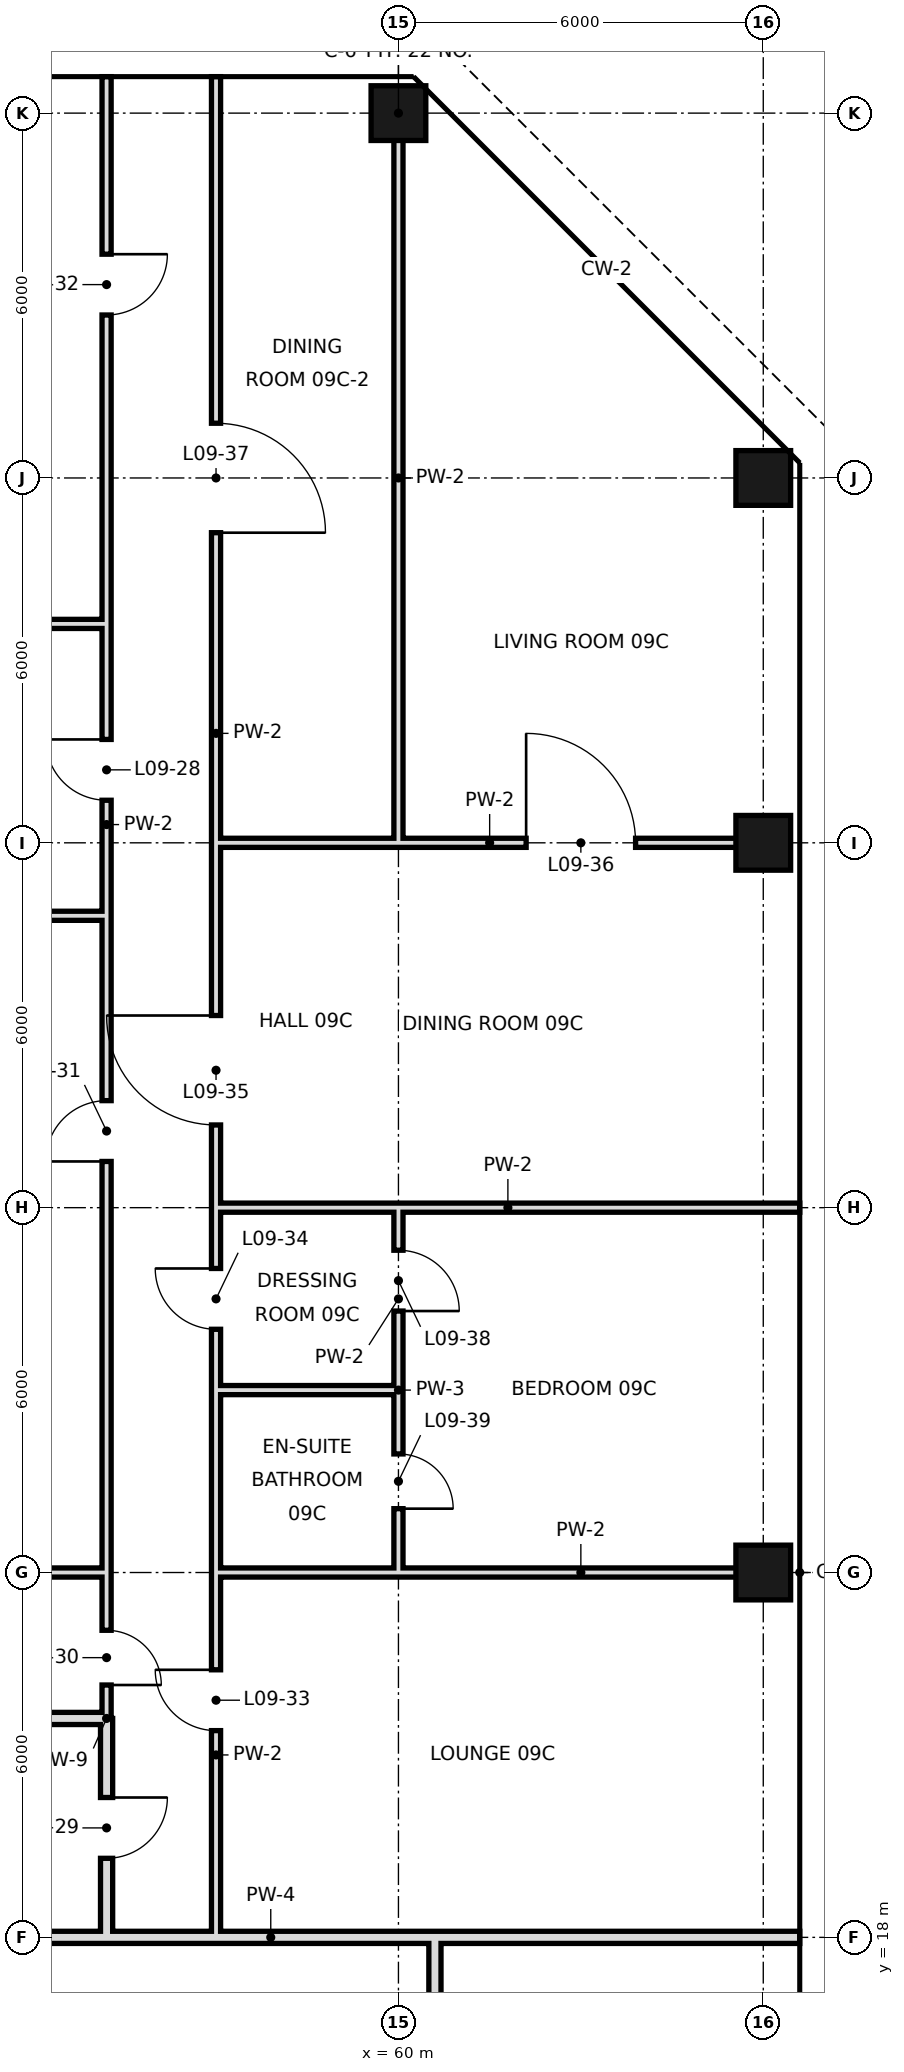
"""IFC4 building model, lengths in metres.
Left out: names, types, materials, properties, quantities, classifications, styles, units other than length and angle.
Written with IfcOpenShell. Run it as: python <this file> out.ifc"""

import sys

from ifc_helpers import new_model, si_unit, direction, frame, frame_2d, origin, origin_2d, place, context, subcontext, project, spatial, rectangle, hollow_rectangle, extrude, element, fill, save


model = new_model("IFC4")
c1 = context("Model", 3, precision=1e-05, world=origin(), true_north=direction((0.0, 1.0)))
c2 = subcontext(c1, "Body", "Model", "MODEL_VIEW")
j1 = project(units=[si_unit("LENGTHUNIT", "METRE"), si_unit("PLANEANGLEUNIT", "RADIAN")], contexts=[c1])
p1 = place(None, origin())
s1 = spatial("IfcSite", under=j1, at=p1, CompositionType="ELEMENT")
p2 = place(p1, origin())
s2 = spatial("IfcBuilding", under=s1, at=p2, CompositionType="ELEMENT")
p3 = place(p2, frame((0.0, 0.0, 53.4)))
s3 = spatial("IfcBuildingStorey", under=s2, at=p3, CompositionType="ELEMENT", Elevation=53.4)
for number, where, z_axis, x_axis in (
    (1, (60.0, 48.0, 0.0), (0.0, 0.0, 1.0), (1.0, 0.0, 0.0)),
    (2, (66.0, 24.0, 0.0), (0.0, 0.0, 1.0), (1.0, 0.0, 0.0)),
    (3, (66.0, 36.0, 0.0), (0.0, 0.0, 1.0), (1.0, 0.0, 0.0)),
    (4, (66.0, 42.0, 0.0), (0.0, 0.0, 1.0), (1.0, 0.0, 0.0)),
):
    element("IfcColumn", number, at=place(p3, frame(where, z_axis=z_axis, x_axis=x_axis)), inside=s3, PredefinedType="COLUMN", context=c2, shape_type="SweptSolid", body=[
        extrude(hollow_rectangle(XDim=0.9, YDim=0.9, WallThickness=0.045, at=origin_2d()), origin(), (0.0, 0.0, 1.0), 3.6),
    ])
p4 = place(p3, frame((55.2, 18.0, 0.0), z_axis=(0.0, 0.0, 1.0), x_axis=(0.0, 1.0, 0.0)))
e5 = element("IfcWall", 5, at=p4, inside=s3, PredefinedType="SOLIDWALL", context=c2, shape_type="SweptSolid", body=[
    extrude(rectangle(XDim=3.6, YDim=0.2, at=frame_2d((1.8, 0.0))), origin(), (0.0, 0.0, 1.0), 2.52),
])
p5 = place(p4, frame((1.3, 0.0, 0.0)))
e6 = element("IfcOpeningElement", 6, at=p5, cuts=e5, PredefinedType="OPENING", context=c2, shape_type="SweptSolid", body=[
    extrude(rectangle(XDim=1.0, YDim=2.4, at=frame_2d((0.5, 1.2))), frame((0.0, 0.11, 0.0), z_axis=(0.0, -1.0, 0.0), x_axis=(1.0, 0.0, 0.0)), (0.0, 0.0, 1.0), 0.22),
])
p6 = place(p3, frame((55.2, 24.0, 0.0), z_axis=(0.0, 0.0, 1.0), x_axis=(0.0, 1.0, 0.0)))
e7 = element("IfcWall", 7, at=p6, inside=s3, PredefinedType="PARTITIONING", context=c2, shape_type="SweptSolid", body=[
    extrude(rectangle(XDim=24.6, YDim=0.15, at=frame_2d((12.3, 0.0))), origin(), (0.0, 0.0, 1.0), 3.42),
])
p7 = place(p6, frame((12.7, 0.0, 0.0)))
e8 = element("IfcOpeningElement", 8, at=p7, cuts=e7, PredefinedType="OPENING", context=c2, shape_type="SweptSolid", body=[
    extrude(rectangle(XDim=1.0, YDim=2.4, at=frame_2d((0.5, 1.2))), frame((0.0, 0.085, 0.0), z_axis=(0.0, -1.0, 0.0), x_axis=(1.0, 0.0, 0.0)), (0.0, 0.0, 1.0), 0.17),
])
p8 = place(p6, frame((6.76, 0.0, 0.0)))
e9 = element("IfcOpeningElement", 9, at=p8, cuts=e7, PredefinedType="OPENING", context=c2, shape_type="SweptSolid", body=[
    extrude(rectangle(XDim=1.0, YDim=2.4, at=frame_2d((0.5, 1.2))), frame((0.0, 0.085, 0.0), z_axis=(0.0, -1.0, 0.0), x_axis=(1.0, 0.0, 0.0)), (0.0, 0.0, 1.0), 0.17),
])
p9 = place(p6, frame((20.68, 0.0, 0.0)))
e10 = element("IfcOpeningElement", 10, at=p9, cuts=e7, PredefinedType="OPENING", context=c2, shape_type="SweptSolid", body=[
    extrude(rectangle(XDim=1.0, YDim=2.4, at=frame_2d((0.5, 1.2))), frame((0.0, 0.085, 0.0), z_axis=(0.0, -1.0, 0.0), x_axis=(1.0, 0.0, 0.0)), (0.0, 0.0, 1.0), 0.17),
])
p10 = place(p3, frame((55.2, 21.6, 0.0), z_axis=(0.0, 0.0, 1.0), x_axis=(0.0, 1.0, 0.0)))
e11 = element("IfcWall", 11, at=p10, inside=s3, PredefinedType="PARTITIONING", context=c2, shape_type="SweptSolid", body=[
    extrude(rectangle(XDim=2.4, YDim=0.15, at=frame_2d((1.2, 0.0))), origin(), (0.0, 0.0, 1.0), 3.42),
])
p11 = place(p10, frame((0.55, 0.0, 0.0)))
e12 = element("IfcOpeningElement", 12, at=p11, cuts=e11, PredefinedType="OPENING", context=c2, shape_type="SweptSolid", body=[
    extrude(rectangle(XDim=0.9, YDim=2.4, at=frame_2d((0.45, 1.2))), frame((0.0, 0.085, 0.0), z_axis=(0.0, -1.0, 0.0), x_axis=(1.0, 0.0, 0.0)), (0.0, 0.0, 1.0), 0.17),
])
p12 = place(p3, frame((57.0, 18.0, 0.0), z_axis=(0.0, 0.0, 1.0), x_axis=(0.0, 1.0, 0.0)))
e13 = element("IfcWall", 13, at=p12, inside=s3, PredefinedType="PARTITIONING", context=c2, shape_type="SweptSolid", body=[
    extrude(rectangle(XDim=6.0, YDim=0.15, at=frame_2d((3.0, 0.0))), origin(), (0.0, 0.0, 1.0), 3.42),
])
p13 = place(p12, frame((3.4, 0.0, 0.0)))
e14 = element("IfcOpeningElement", 14, at=p13, cuts=e13, PredefinedType="OPENING", context=c2, shape_type="SweptSolid", body=[
    extrude(rectangle(XDim=1.0, YDim=2.4, at=frame_2d((0.5, 1.2))), frame((0.0, 0.085, 0.0), z_axis=(0.0, -1.0, 0.0), x_axis=(1.0, 0.0, 0.0)), (0.0, 0.0, 1.0), 0.17),
])
p14 = place(p3, frame((57.0, 27.0, 0.0), z_axis=(0.0, 0.0, 1.0), x_axis=(0.0, 1.0, 0.0)))
e15 = element("IfcWall", 15, at=p14, inside=s3, PredefinedType="PARTITIONING", context=c2, shape_type="SweptSolid", body=[
    extrude(rectangle(XDim=21.6, YDim=0.15, at=frame_2d((10.8, 0.0))), origin(), (0.0, 0.0, 1.0), 3.42),
])
p15 = place(p14, frame((1.0, 0.0, 0.0)))
e16 = element("IfcOpeningElement", 16, at=p15, cuts=e15, PredefinedType="OPENING", context=c2, shape_type="SweptSolid", body=[
    extrude(rectangle(XDim=1.0, YDim=2.4, at=frame_2d((0.5, 1.2))), frame((0.0, 0.085, 0.0), z_axis=(0.0, -1.0, 0.0), x_axis=(1.0, 0.0, 0.0)), (0.0, 0.0, 1.0), 0.17),
])
p16 = place(p14, frame((4.36, 0.0, 0.0)))
e17 = element("IfcOpeningElement", 17, at=p16, cuts=e15, PredefinedType="OPENING", context=c2, shape_type="SweptSolid", body=[
    extrude(rectangle(XDim=1.8, YDim=2.4, at=frame_2d((0.9, 1.2))), frame((0.0, 0.085, 0.0), z_axis=(0.0, -1.0, 0.0), x_axis=(1.0, 0.0, 0.0)), (0.0, 0.0, 1.0), 0.17),
])
p17 = place(p14, frame((14.1, 0.0, 0.0)))
e18 = element("IfcOpeningElement", 18, at=p17, cuts=e15, PredefinedType="OPENING", context=c2, shape_type="SweptSolid", body=[
    extrude(rectangle(XDim=1.8, YDim=2.4, at=frame_2d((0.9, 1.2))), frame((0.0, 0.085, 0.0), z_axis=(0.0, -1.0, 0.0), x_axis=(1.0, 0.0, 0.0)), (0.0, 0.0, 1.0), 0.17),
])
p18 = place(p3, frame((57.0, 24.0, 0.0), z_axis=(0.0, 0.0, 1.0), x_axis=(0.0, 1.0, 0.0)))
e19 = element("IfcWall", 19, at=p18, inside=s3, PredefinedType="PARTITIONING", context=c2, shape_type="SweptSolid", body=[
    extrude(rectangle(XDim=3.0, YDim=0.15, at=frame_2d((1.5, 0.0))), origin(), (0.0, 0.0, 1.0), 3.42),
])
p19 = place(p3, frame((60.0, 27.0, 0.0), z_axis=(0.0, 0.0, 1.0), x_axis=(0.0, 1.0, 0.0)))
e20 = element("IfcWall", 20, at=p19, inside=s3, PredefinedType="PARTITIONING", context=c2, shape_type="SweptSolid", body=[
    extrude(rectangle(XDim=3.0, YDim=0.15, at=frame_2d((1.5, 0.0))), origin(), (0.0, 0.0, 1.0), 3.42),
])
p20 = place(p19, frame((1.3, 0.0, 0.0)))
e21 = element("IfcOpeningElement", 21, at=p20, cuts=e20, PredefinedType="OPENING", context=c2, shape_type="SweptSolid", body=[
    extrude(rectangle(XDim=1.0, YDim=2.4, at=frame_2d((0.5, 1.2))), frame((0.0, 0.085, 0.0), z_axis=(0.0, -1.0, 0.0), x_axis=(1.0, 0.0, 0.0)), (0.0, 0.0, 1.0), 0.17),
])
p21 = place(p3, frame((60.0, 36.0, 0.0), z_axis=(0.0, 0.0, 1.0), x_axis=(0.0, 1.0, 0.0)))
e22 = element("IfcWall", 22, at=p21, inside=s3, PredefinedType="PARTITIONING", context=c2, shape_type="SweptSolid", body=[
    extrude(rectangle(XDim=12.0, YDim=0.15, at=frame_2d((6.0, 0.0))), origin(), (0.0, 0.0, 1.0), 3.42),
])
p22 = place(p3, frame((60.0, 24.0, 0.0), z_axis=(0.0, 0.0, 1.0), x_axis=(0.0, 1.0, 0.0)))
e23 = element("IfcWall", 23, at=p22, inside=s3, PredefinedType="PARTITIONING", context=c2, shape_type="SweptSolid", body=[
    extrude(rectangle(XDim=3.0, YDim=0.15, at=frame_2d((1.5, 0.0))), origin(), (0.0, 0.0, 1.0), 3.42),
])
p23 = place(p22, frame((1.05, 0.0, 0.0)))
e24 = element("IfcOpeningElement", 24, at=p23, cuts=e23, PredefinedType="OPENING", context=c2, shape_type="SweptSolid", body=[
    extrude(rectangle(XDim=0.9, YDim=2.4, at=frame_2d((0.45, 1.2))), frame((0.0, 0.085, 0.0), z_axis=(0.0, -1.0, 0.0), x_axis=(1.0, 0.0, 0.0)), (0.0, 0.0, 1.0), 0.17),
])
p24 = place(p3, frame((60.6, 10.8, 0.0), z_axis=(0.0, 0.0, 1.0), x_axis=(0.0, 1.0, 0.0)))
e25 = element("IfcWall", 25, at=p24, inside=s3, PredefinedType="SOLIDWALL", context=c2, shape_type="SweptSolid", body=[
    extrude(rectangle(XDim=7.2, YDim=0.2, at=frame_2d((3.6, 0.0))), origin(), (0.0, 0.0, 1.0), 2.52),
])
p25 = place(p3, frame((44.9, 18.0, 0.0), z_axis=(0.0, 0.0, 1.0), x_axis=(1.0, 0.0, 0.0)))
e26 = element("IfcWall", 26, at=p25, inside=s3, PredefinedType="SOLIDWALL", context=c2, shape_type="SweptSolid", body=[
    extrude(rectangle(XDim=10.3, YDim=0.2, at=frame_2d((5.15, 0.0))), origin(), (0.0, 0.0, 1.0), 2.52),
])
p26 = place(p3, frame((60.6, 18.0, 0.0), z_axis=(0.0, 0.0, 1.0), x_axis=(1.0, 0.0, 0.0)))
e27 = element("IfcWall", 27, at=p26, inside=s3, PredefinedType="SOLIDWALL", context=c2, shape_type="SweptSolid", body=[
    extrude(rectangle(XDim=6.0, YDim=0.2, at=frame_2d((3.0, 0.0))), origin(), (0.0, 0.0, 1.0), 2.52),
])
p27 = place(p3, frame((55.2, 18.0, 0.0), z_axis=(0.0, 0.0, 1.0), x_axis=(1.0, 0.0, 0.0)))
e28 = element("IfcWall", 28, at=p27, inside=s3, PredefinedType="SOLIDWALL", context=c2, shape_type="SweptSolid", body=[
    extrude(rectangle(XDim=5.4, YDim=0.2, at=frame_2d((2.7, 0.0))), origin(), (0.0, 0.0, 1.0), 2.52),
])
p28 = place(p3, frame((44.9, 21.6, 0.0), z_axis=(0.0, 0.0, 1.0), x_axis=(1.0, 0.0, 0.0)))
e29 = element("IfcWall", 29, at=p28, inside=s3, PredefinedType="SOLIDWALL", context=c2, shape_type="SweptSolid", body=[
    extrude(rectangle(XDim=10.3, YDim=0.2, at=frame_2d((5.15, 0.0))), origin(), (0.0, 0.0, 1.0), 2.72),
])
p29 = place(p3, frame((60.0, 24.0, 0.0), z_axis=(0.0, 0.0, 1.0), x_axis=(1.0, 0.0, 0.0)))
e30 = element("IfcWall", 30, at=p29, inside=s3, PredefinedType="PARTITIONING", context=c2, shape_type="SweptSolid", body=[
    extrude(rectangle(XDim=6.0, YDim=0.15, at=frame_2d((3.0, 0.0))), origin(), (0.0, 0.0, 1.0), 2.52),
])
p30 = place(p3, frame((44.9, 24.0, 0.0), z_axis=(0.0, 0.0, 1.0), x_axis=(1.0, 0.0, 0.0)))
e31 = element("IfcWall", 31, at=p30, inside=s3, PredefinedType="PARTITIONING", context=c2, shape_type="SweptSolid", body=[
    extrude(rectangle(XDim=10.3, YDim=0.15, at=frame_2d((5.15, 0.0))), origin(), (0.0, 0.0, 1.0), 2.52),
])
p31 = place(p3, frame((57.0, 24.0, 0.0), z_axis=(0.0, 0.0, 1.0), x_axis=(1.0, 0.0, 0.0)))
e32 = element("IfcWall", 32, at=p31, inside=s3, PredefinedType="PARTITIONING", context=c2, shape_type="SweptSolid", body=[
    extrude(rectangle(XDim=3.0, YDim=0.15, at=frame_2d((1.5, 0.0))), origin(), (0.0, 0.0, 1.0), 2.52),
])
p32 = place(p3, frame((57.0, 27.0, 0.0), z_axis=(0.0, 0.0, 1.0), x_axis=(1.0, 0.0, 0.0)))
e33 = element("IfcWall", 33, at=p32, inside=s3, PredefinedType="PARTITIONING", context=c2, shape_type="SweptSolid", body=[
    extrude(rectangle(XDim=3.0, YDim=0.15, at=frame_2d((1.5, 0.0))), origin(), (0.0, 0.0, 1.0), 3.42),
])
p33 = place(p3, frame((57.0, 30.0, 0.0), z_axis=(0.0, 0.0, 1.0), x_axis=(1.0, 0.0, 0.0)))
e34 = element("IfcWall", 34, at=p33, inside=s3, PredefinedType="PARTITIONING", context=c2, shape_type="SweptSolid", body=[
    extrude(rectangle(XDim=9.6, YDim=0.15, at=frame_2d((4.8, 0.0))), origin(), (0.0, 0.0, 1.0), 2.52),
])
p34 = place(p3, frame((44.9, 34.8, 0.0), z_axis=(0.0, 0.0, 1.0), x_axis=(1.0, 0.0, 0.0)))
e35 = element("IfcWall", 35, at=p34, inside=s3, PredefinedType="PARTITIONING", context=c2, shape_type="SweptSolid", body=[
    extrude(rectangle(XDim=10.3, YDim=0.15, at=frame_2d((5.15, 0.0))), origin(), (0.0, 0.0, 1.0), 3.42),
])
p35 = place(p3, frame((57.0, 36.0, 0.0), z_axis=(0.0, 0.0, 1.0), x_axis=(1.0, 0.0, 0.0)))
e36 = element("IfcWall", 36, at=p35, inside=s3, PredefinedType="PARTITIONING", context=c2, shape_type="SweptSolid", body=[
    extrude(rectangle(XDim=9.0, YDim=0.15, at=frame_2d((4.5, 0.0))), origin(), (0.0, 0.0, 1.0), 2.52),
])
p36 = place(p35, frame((5.1, 0.0, 0.0)))
e37 = element("IfcOpeningElement", 37, at=p36, cuts=e36, PredefinedType="OPENING", context=c2, shape_type="SweptSolid", body=[
    extrude(rectangle(XDim=1.8, YDim=2.4, at=frame_2d((0.9, 1.2))), frame((0.0, 0.085, 0.0), z_axis=(0.0, -1.0, 0.0), x_axis=(1.0, 0.0, 0.0)), (0.0, 0.0, 1.0), 0.17),
])
p37 = place(p3, frame((44.9, 39.6, 0.0), z_axis=(0.0, 0.0, 1.0), x_axis=(1.0, 0.0, 0.0)))
e38 = element("IfcWall", 38, at=p37, inside=s3, PredefinedType="PARTITIONING", context=c2, shape_type="SweptSolid", body=[
    extrude(rectangle(XDim=10.3, YDim=0.15, at=frame_2d((5.15, 0.0))), origin(), (0.0, 0.0, 1.0), 3.42),
])
p38 = place(p7, frame((1.0, 0.0, 0.0), z_axis=(0.0, 0.0, 1.0), x_axis=(-1.0, 0.0, 0.0)))
e39 = element("IfcDoor", 39, at=p38, inside=s3, OperationType="SINGLE_SWING_LEFT", PredefinedType="DOOR", context=c2, shape_type="SweptSolid", body=[
    extrude(rectangle(XDim=1.0, YDim=2.4, at=frame_2d((0.5, 1.2))), frame((0.0, 0.025, 0.0), z_axis=(0.0, -1.0, 0.0), x_axis=(1.0, 0.0, 0.0)), (0.0, 0.0, 1.0), 0.05),
])
fill(e8, e39)
p39 = place(p5, origin())
e40 = element("IfcDoor", 40, at=p39, inside=s3, OperationType="SINGLE_SWING_RIGHT", PredefinedType="DOOR", context=c2, shape_type="SweptSolid", body=[
    extrude(rectangle(XDim=1.0, YDim=2.4, at=frame_2d((0.5, 1.2))), frame((0.0, 0.025, 0.0), z_axis=(0.0, -1.0, 0.0), x_axis=(1.0, 0.0, 0.0)), (0.0, 0.0, 1.0), 0.05),
])
fill(e6, e40)
p40 = place(p11, frame((0.9, 0.0, 0.0), z_axis=(0.0, 0.0, 1.0), x_axis=(-1.0, 0.0, 0.0)))
e41 = element("IfcDoor", 41, at=p40, inside=s3, OperationType="SINGLE_SWING_RIGHT", PredefinedType="DOOR", context=c2, shape_type="SweptSolid", body=[
    extrude(rectangle(XDim=0.9, YDim=2.4, at=frame_2d((0.45, 1.2))), frame((0.0, 0.025, 0.0), z_axis=(0.0, -1.0, 0.0), x_axis=(1.0, 0.0, 0.0)), (0.0, 0.0, 1.0), 0.05),
])
fill(e12, e41)
p41 = place(p8, origin())
e42 = element("IfcDoor", 42, at=p41, inside=s3, OperationType="SINGLE_SWING_LEFT", PredefinedType="DOOR", context=c2, shape_type="SweptSolid", body=[
    extrude(rectangle(XDim=1.0, YDim=2.4, at=frame_2d((0.5, 1.2))), frame((0.0, 0.025, 0.0), z_axis=(0.0, -1.0, 0.0), x_axis=(1.0, 0.0, 0.0)), (0.0, 0.0, 1.0), 0.05),
])
fill(e9, e42)
p42 = place(p9, origin())
e43 = element("IfcDoor", 43, at=p42, inside=s3, OperationType="SINGLE_SWING_RIGHT", PredefinedType="DOOR", context=c2, shape_type="SweptSolid", body=[
    extrude(rectangle(XDim=1.0, YDim=2.4, at=frame_2d((0.5, 1.2))), frame((0.0, 0.025, 0.0), z_axis=(0.0, -1.0, 0.0), x_axis=(1.0, 0.0, 0.0)), (0.0, 0.0, 1.0), 0.05),
])
fill(e10, e43)
p43 = place(p13, frame((1.0, 0.0, 0.0), z_axis=(0.0, 0.0, 1.0), x_axis=(-1.0, 0.0, 0.0)))
e44 = element("IfcDoor", 44, at=p43, inside=s3, OperationType="SINGLE_SWING_LEFT", PredefinedType="DOOR", context=c2, shape_type="SweptSolid", body=[
    extrude(rectangle(XDim=1.0, YDim=2.4, at=frame_2d((0.5, 1.2))), frame((0.0, 0.025, 0.0), z_axis=(0.0, -1.0, 0.0), x_axis=(1.0, 0.0, 0.0)), (0.0, 0.0, 1.0), 0.05),
])
fill(e14, e44)
p44 = place(p15, frame((1.0, 0.0, 0.0), z_axis=(0.0, 0.0, 1.0), x_axis=(-1.0, 0.0, 0.0)))
e45 = element("IfcDoor", 45, at=p44, inside=s3, OperationType="SINGLE_SWING_LEFT", PredefinedType="DOOR", context=c2, shape_type="SweptSolid", body=[
    extrude(rectangle(XDim=1.0, YDim=2.4, at=frame_2d((0.5, 1.2))), frame((0.0, 0.025, 0.0), z_axis=(0.0, -1.0, 0.0), x_axis=(1.0, 0.0, 0.0)), (0.0, 0.0, 1.0), 0.05),
])
fill(e16, e45)
p45 = place(p16, frame((1.8, 0.0, 0.0), z_axis=(0.0, 0.0, 1.0), x_axis=(-1.0, 0.0, 0.0)))
e46 = element("IfcDoor", 46, at=p45, inside=s3, OperationType="SINGLE_SWING_LEFT", PredefinedType="DOOR", context=c2, shape_type="SweptSolid", body=[
    extrude(rectangle(XDim=1.8, YDim=2.4, at=frame_2d((0.9, 1.2))), frame((0.0, 0.025, 0.0), z_axis=(0.0, -1.0, 0.0), x_axis=(1.0, 0.0, 0.0)), (0.0, 0.0, 1.0), 0.05),
])
fill(e17, e46)
p46 = place(p36, origin())
e47 = element("IfcDoor", 47, at=p46, inside=s3, OperationType="SINGLE_SWING_LEFT", PredefinedType="DOOR", context=c2, shape_type="SweptSolid", body=[
    extrude(rectangle(XDim=1.8, YDim=2.4, at=frame_2d((0.9, 1.2))), frame((0.0, 0.025, 0.0), z_axis=(0.0, -1.0, 0.0), x_axis=(1.0, 0.0, 0.0)), (0.0, 0.0, 1.0), 0.05),
])
fill(e37, e47)
p47 = place(p17, frame((1.8, 0.0, 0.0), z_axis=(0.0, 0.0, 1.0), x_axis=(-1.0, 0.0, 0.0)))
e48 = element("IfcDoor", 48, at=p47, inside=s3, OperationType="SINGLE_SWING_RIGHT", PredefinedType="DOOR", context=c2, shape_type="SweptSolid", body=[
    extrude(rectangle(XDim=1.8, YDim=2.4, at=frame_2d((0.9, 1.2))), frame((0.0, 0.025, 0.0), z_axis=(0.0, -1.0, 0.0), x_axis=(1.0, 0.0, 0.0)), (0.0, 0.0, 1.0), 0.05),
])
fill(e18, e48)
p48 = place(p20, frame((1.0, 0.0, 0.0), z_axis=(0.0, 0.0, 1.0), x_axis=(-1.0, 0.0, 0.0)))
e49 = element("IfcDoor", 49, at=p48, inside=s3, OperationType="SINGLE_SWING_RIGHT", PredefinedType="DOOR", context=c2, shape_type="SweptSolid", body=[
    extrude(rectangle(XDim=1.0, YDim=2.4, at=frame_2d((0.5, 1.2))), frame((0.0, 0.025, 0.0), z_axis=(0.0, -1.0, 0.0), x_axis=(1.0, 0.0, 0.0)), (0.0, 0.0, 1.0), 0.05),
])
fill(e21, e49)
p49 = place(p23, frame((0.9, 0.0, 0.0), z_axis=(0.0, 0.0, 1.0), x_axis=(-1.0, 0.0, 0.0)))
e50 = element("IfcDoor", 50, at=p49, inside=s3, OperationType="SINGLE_SWING_RIGHT", PredefinedType="DOOR", context=c2, shape_type="SweptSolid", body=[
    extrude(rectangle(XDim=0.9, YDim=2.4, at=frame_2d((0.45, 1.2))), frame((0.0, 0.025, 0.0), z_axis=(0.0, -1.0, 0.0), x_axis=(1.0, 0.0, 0.0)), (0.0, 0.0, 1.0), 0.05),
])
fill(e24, e50)
save(model, sys.argv[1])
